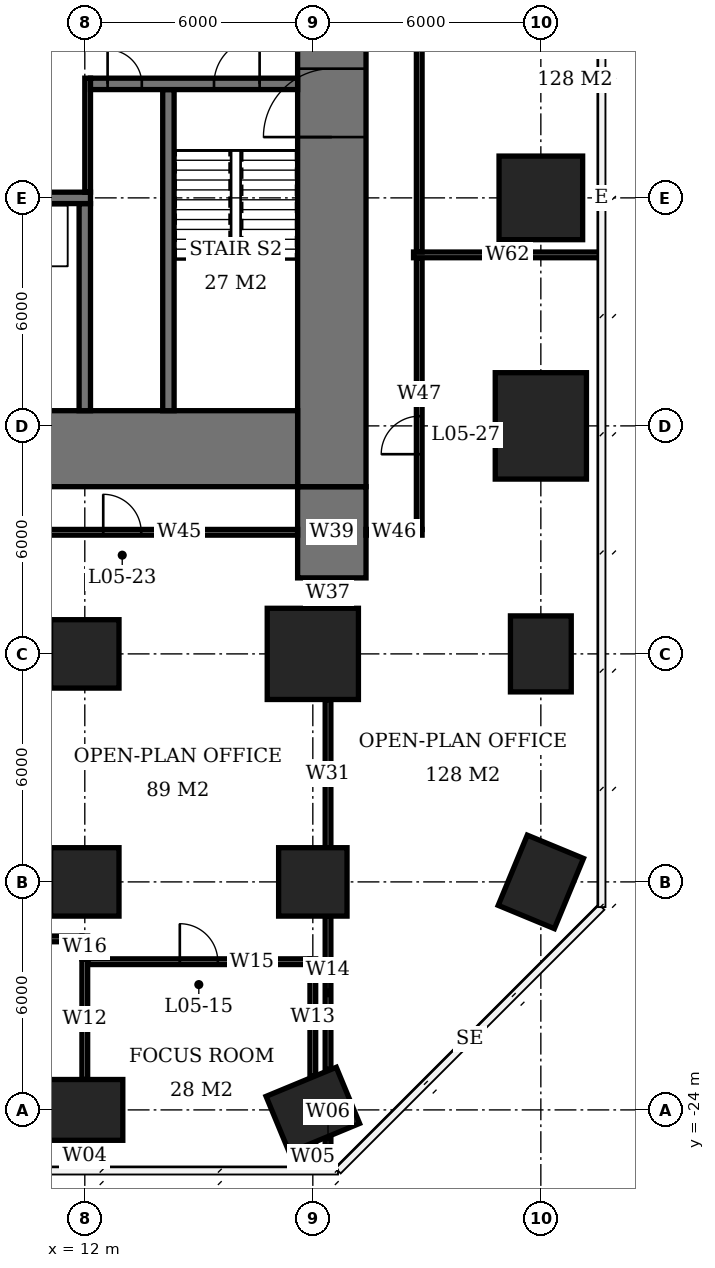
"""IFC4 building model, lengths in metres.
Left out: names, types, materials, properties, quantities, classifications, styles, units other than length and angle.
Written with IfcOpenShell. Run it as: python <this file> out.ifc"""

import sys

from ifc_helpers import new_model, si_unit, direction, frame, frame_2d, origin, origin_2d, place, context, subcontext, project, spatial, rectangle, extrude, element, fill, save


model = new_model("IFC4")
c1 = context("Model", 3, precision=1e-05, world=origin(), true_north=direction((0.0, 1.0)))
c2 = subcontext(c1, "Body", "Model", "MODEL_VIEW")
j1 = project(units=[si_unit("LENGTHUNIT", "METRE"), si_unit("PLANEANGLEUNIT", "RADIAN")], contexts=[c1])
p1 = place(None, origin())
s1 = spatial("IfcSite", under=j1, at=p1, CompositionType="ELEMENT")
p2 = place(p1, origin())
s2 = spatial("IfcBuilding", under=s1, at=p2, CompositionType="ELEMENT")
p3 = place(p2, frame((0.0, 0.0, 26.0)))
s3 = spatial("IfcBuildingStorey", under=s2, at=p3, CompositionType="ELEMENT", Elevation=26.0)
p4 = place(p3, frame((12.0, -24.0, 0.0), z_axis=(0.0, 0.0, 1.0), x_axis=(1.0, 0.0, 0.0)))
e1 = element("IfcColumn", 1, at=p4, inside=s3, PredefinedType="COLUMN", context=c2, shape_type="SweptSolid", body=[
    extrude(rectangle(XDim=2.0, YDim=1.6, at=origin_2d()), origin(), (0.0, 0.0, 1.0), 3.9),
])
for number, where, z_axis, x_axis in (
    (2, (12.0, -18.0, 0.0), (0.0, 0.0, 1.0), (1.0, 0.0, 0.0)),
    (3, (12.0, -12.0, 0.0), (0.0, 0.0, 1.0), (1.0, 0.0, 0.0)),
):
    element("IfcColumn", number, at=place(p3, frame(where, z_axis=z_axis, x_axis=x_axis)), inside=s3, PredefinedType="COLUMN", context=c2, shape_type="SweptSolid", body=[
        extrude(rectangle(XDim=1.8, YDim=1.8, at=origin_2d()), origin(), (0.0, 0.0, 1.0), 3.9),
    ])
p5 = place(p3, frame((18.0, -24.0, 0.0), z_axis=(0.0, 0.0, 1.0), x_axis=(-0.923879532511, -0.382683432365, 0.0)))
e4 = element("IfcColumn", 4, at=p5, inside=s3, PredefinedType="COLUMN", context=c2, shape_type="SweptSolid", body=[
    extrude(rectangle(XDim=2.0, YDim=1.6, at=origin_2d()), origin(), (0.0, 0.0, 1.0), 3.9),
])
p6 = place(p3, frame((18.0, -18.0, 0.0), z_axis=(0.0, 0.0, 1.0), x_axis=(1.0, 0.0, 0.0)))
e5 = element("IfcColumn", 5, at=p6, inside=s3, PredefinedType="COLUMN", context=c2, shape_type="SweptSolid", body=[
    extrude(rectangle(XDim=1.8, YDim=1.8, at=origin_2d()), origin(), (0.0, 0.0, 1.0), 3.9),
])
p7 = place(p3, frame((18.0, -12.0, 0.0), z_axis=(0.0, 0.0, 1.0), x_axis=(1.0, 0.0, 0.0)))
e6 = element("IfcColumn", 6, at=p7, inside=s3, PredefinedType="COLUMN", context=c2, shape_type="SweptSolid", body=[
    extrude(rectangle(XDim=2.4, YDim=2.4, at=origin_2d()), origin(), (0.0, 0.0, 1.0), 3.9),
])
for number, where, z_axis, x_axis in (
    (7, (24.0, -18.0, 0.0), (0.0, 0.0, 1.0), (-0.383, -0.924, 0.0)),
    (8, (24.0, -12.0, 0.0), (0.0, 0.0, 1.0), (0.0, 1.0, 0.0)),
):
    element("IfcColumn", number, at=place(p3, frame(where, z_axis=z_axis, x_axis=x_axis)), inside=s3, PredefinedType="COLUMN", context=c2, shape_type="SweptSolid", body=[
        extrude(rectangle(XDim=2.0, YDim=1.6, at=origin_2d()), origin(), (0.0, 0.0, 1.0), 3.9),
    ])
p8 = place(p3, frame((24.0, -6.0, 0.0), z_axis=(0.0, 0.0, 1.0), x_axis=(0.0, 1.0, 0.0)))
e9 = element("IfcColumn", 9, at=p8, inside=s3, PredefinedType="COLUMN", context=c2, shape_type="SweptSolid", body=[
    extrude(rectangle(XDim=2.8, YDim=2.4, at=origin_2d()), origin(), (0.0, 0.0, 1.0), 3.9),
])
p9 = place(p3, frame((24.0, 0.0, 0.0), z_axis=(0.0, 0.0, 1.0), x_axis=(1.0, 0.0, 0.0)))
e10 = element("IfcColumn", 10, at=p9, inside=s3, PredefinedType="COLUMN", context=c2, shape_type="SweptSolid", body=[
    extrude(rectangle(XDim=2.2, YDim=2.2, at=origin_2d()), origin(), (0.0, 0.0, 1.0), 3.9),
])
p10 = place(p3, frame((-5.6, -6.6, 0.0), z_axis=(0.0, 0.0, 1.0), x_axis=(1.0, 0.0, 0.0)))
e11 = element("IfcWall", 11, at=p10, inside=s3, PredefinedType="SHEAR", context=c2, shape_type="SweptSolid", body=[
    extrude(rectangle(XDim=23.2, YDim=2.0, at=frame_2d((11.6, 0.0))), origin(), (0.0, 0.0, 1.0), 3.9),
])
p11 = place(p3, frame((18.5, -7.6, 0.0), z_axis=(0.0, 0.0, 1.0), x_axis=(0.0, 1.0, 0.0)))
e12 = element("IfcWall", 12, at=p11, inside=s3, PredefinedType="SHEAR", context=c2, shape_type="SweptSolid", body=[
    extrude(rectangle(XDim=21.2, YDim=1.8, at=frame_2d((10.6, 0.0))), origin(), (0.0, 0.0, 1.0), 3.9),
])
p12 = place(p11, frame((9.2, 0.0, 0.0)))
e13 = element("IfcOpeningElement", 13, at=p12, cuts=e12, PredefinedType="OPENING", context=c2, shape_type="SweptSolid", body=[
    extrude(rectangle(XDim=1.8, YDim=2.4, at=frame_2d((0.9, 1.2))), frame((0.0, 0.91, 0.0), z_axis=(0.0, -1.0, 0.0), x_axis=(1.0, 0.0, 0.0)), (0.0, 0.0, 1.0), 1.82),
])
p13 = place(p3, frame((18.5, -10.0, 0.0), z_axis=(0.0, 0.0, 1.0), x_axis=(0.0, 1.0, 0.0)))
e14 = element("IfcWall", 14, at=p13, inside=s3, PredefinedType="SHEAR", context=c2, shape_type="SweptSolid", body=[
    extrude(rectangle(XDim=2.4, YDim=1.8, at=frame_2d((1.2, 0.0))), origin(), (0.0, 0.0, 1.0), 3.9),
])
p14 = place(p3, frame((-5.6, 0.0, 0.0), z_axis=(0.0, 0.0, 1.0), x_axis=(1.0, 0.0, 0.0)))
e15 = element("IfcWall", 15, at=p14, inside=s3, PredefinedType="SHEAR", context=c2, shape_type="SweptSolid", body=[
    extrude(rectangle(XDim=17.75, YDim=0.3, at=frame_2d((8.875, 0.0))), origin(), (0.0, 0.0, 1.0), 3.9),
])
p15 = place(p14, frame((0.6, 0.0, 0.0)))
e16 = element("IfcOpeningElement", 16, at=p15, cuts=e15, PredefinedType="OPENING", context=c2, shape_type="SweptSolid", body=[
    extrude(rectangle(XDim=0.9, YDim=2.1, at=frame_2d((0.45, 1.05))), frame((0.0, 0.16, 0.0), z_axis=(0.0, -1.0, 0.0), x_axis=(1.0, 0.0, 0.0)), (0.0, 0.0, 1.0), 0.32),
])
p16 = place(p14, frame((3.7, 0.0, 0.0)))
e17 = element("IfcOpeningElement", 17, at=p16, cuts=e15, PredefinedType="OPENING", context=c2, shape_type="SweptSolid", body=[
    extrude(rectangle(XDim=0.9, YDim=2.1, at=frame_2d((0.45, 1.05))), frame((0.0, 0.16, 0.0), z_axis=(0.0, -1.0, 0.0), x_axis=(1.0, 0.0, 0.0)), (0.0, 0.0, 1.0), 0.32),
])
p17 = place(p3, frame((12.15, 3.0, 0.0), z_axis=(0.0, 0.0, 1.0), x_axis=(1.0, 0.0, 0.0)))
e18 = element("IfcWall", 18, at=p17, inside=s3, PredefinedType="SHEAR", context=c2, shape_type="SweptSolid", body=[
    extrude(rectangle(XDim=5.45, YDim=0.3, at=frame_2d((2.725, 0.0))), origin(), (0.0, 0.0, 1.0), 3.9),
])
p18 = place(p17, frame((3.25, 0.0, 0.0)))
e19 = element("IfcOpeningElement", 19, at=p18, cuts=e18, PredefinedType="OPENING", context=c2, shape_type="SweptSolid", body=[
    extrude(rectangle(XDim=1.2, YDim=2.1, at=frame_2d((0.6, 1.05))), frame((0.0, 0.16, 0.0), z_axis=(0.0, -1.0, 0.0), x_axis=(1.0, 0.0, 0.0)), (0.0, 0.0, 1.0), 0.32),
])
p19 = place(p17, frame((0.45, 0.0, 0.0)))
e20 = element("IfcOpeningElement", 20, at=p19, cuts=e18, PredefinedType="OPENING", context=c2, shape_type="SweptSolid", body=[
    extrude(rectangle(XDim=0.9, YDim=2.1, at=frame_2d((0.45, 1.05))), frame((0.0, 0.16, 0.0), z_axis=(0.0, -1.0, 0.0), x_axis=(1.0, 0.0, 0.0)), (0.0, 0.0, 1.0), 0.32),
])
p20 = place(p3, frame((12.0, -5.6, 0.0), z_axis=(0.0, 0.0, 1.0), x_axis=(0.0, 1.0, 0.0)))
e21 = element("IfcWall", 21, at=p20, inside=s3, PredefinedType="SHEAR", context=c2, shape_type="SweptSolid", body=[
    extrude(rectangle(XDim=5.45, YDim=0.3, at=frame_2d((2.725, 0.0))), origin(), (0.0, 0.0, 1.0), 3.9),
])
p21 = place(p3, frame((14.2, -5.6, 0.0), z_axis=(0.0, 0.0, 1.0), x_axis=(0.0, 1.0, 0.0)))
e22 = element("IfcWall", 22, at=p21, inside=s3, PredefinedType="SHEAR", context=c2, shape_type="SweptSolid", body=[
    extrude(rectangle(XDim=8.45, YDim=0.3, at=frame_2d((4.225, 0.0))), origin(), (0.0, 0.0, 1.0), 3.9),
])
p22 = place(p3, frame((12.075, -20.1, 0.0), z_axis=(0.0, 0.0, 1.0), x_axis=(1.0, 0.0, 0.0)))
e23 = element("IfcWall", 23, at=p22, inside=s3, PredefinedType="PARTITIONING", context=c2, shape_type="SweptSolid", body=[
    extrude(rectangle(XDim=5.85, YDim=0.15, at=frame_2d((2.925, 0.0))), origin(), (0.0, 0.0, 1.0), 3.65),
])
p23 = place(p22, frame((2.425, 0.0, 0.0)))
e24 = element("IfcOpeningElement", 24, at=p23, cuts=e23, PredefinedType="OPENING", context=c2, shape_type="SweptSolid", body=[
    extrude(rectangle(XDim=1.0, YDim=2.1, at=frame_2d((0.5, 1.05))), frame((0.0, 0.085, 0.0), z_axis=(0.0, -1.0, 0.0), x_axis=(1.0, 0.0, 0.0)), (0.0, 0.0, 1.0), 0.17),
])
p24 = place(p3, frame((6.075, -19.5, 0.0), z_axis=(0.0, 0.0, 1.0), x_axis=(1.0, 0.0, 0.0)))
e25 = element("IfcWall", 25, at=p24, inside=s3, PredefinedType="PARTITIONING", context=c2, shape_type="SweptSolid", body=[
    extrude(rectangle(XDim=5.85, YDim=0.15, at=frame_2d((2.925, 0.0))), origin(), (0.0, 0.0, 1.0), 3.65),
])
p25 = place(p24, frame((2.425, 0.0, 0.0)))
e26 = element("IfcOpeningElement", 26, at=p25, cuts=e25, PredefinedType="OPENING", context=c2, shape_type="SweptSolid", body=[
    extrude(rectangle(XDim=1.0, YDim=2.1, at=frame_2d((0.5, 1.05))), frame((0.0, 0.085, 0.0), z_axis=(0.0, -1.0, 0.0), x_axis=(1.0, 0.0, 0.0)), (0.0, 0.0, 1.0), 0.17),
])
p26 = place(p3, frame((12.0, -25.6, 0.0), z_axis=(0.0, 0.0, 1.0), x_axis=(0.0, 1.0, 0.0)))
e27 = element("IfcWall", 27, at=p26, inside=s3, PredefinedType="PARTITIONING", context=c2, shape_type="SweptSolid", body=[
    extrude(rectangle(XDim=0.8, YDim=0.15, at=frame_2d((0.4, 0.0))), origin(), (0.0, 0.0, 1.0), 3.65),
])
p27 = place(p3, frame((12.0, -23.2, 0.0), z_axis=(0.0, 0.0, 1.0), x_axis=(0.0, 1.0, 0.0)))
e28 = element("IfcWall", 28, at=p27, inside=s3, PredefinedType="PARTITIONING", context=c2, shape_type="SweptSolid", body=[
    extrude(rectangle(XDim=3.175, YDim=0.15, at=frame_2d((1.587, 0.0))), origin(), (0.0, 0.0, 1.0), 3.65),
])
p28 = place(p3, frame((12.0, -20.025, 0.0), z_axis=(0.0, 0.0, 1.0), x_axis=(0.0, 1.0, 0.0)))
e29 = element("IfcWall", 29, at=p28, inside=s3, PredefinedType="PARTITIONING", context=c2, shape_type="SweptSolid", body=[
    extrude(rectangle(XDim=0.6, YDim=0.15, at=frame_2d((0.3, 0.0))), origin(), (0.0, 0.0, 1.0), 3.65),
])
p29 = place(p3, frame((18.0, -25.6, 0.0), z_axis=(0.0, 0.0, 1.0), x_axis=(0.0, 1.0, 0.0)))
e30 = element("IfcWall", 30, at=p29, inside=s3, PredefinedType="PARTITIONING", context=c2, shape_type="SweptSolid", body=[
    extrude(rectangle(XDim=0.703, YDim=0.15, at=frame_2d((0.352, 0.0))), origin(), (0.0, 0.0, 1.0), 3.65),
])
p30 = place(p3, frame((18.0, -23.103, 0.0), z_axis=(0.0, 0.0, 1.0), x_axis=(0.0, 1.0, 0.0)))
e31 = element("IfcWall", 31, at=p30, inside=s3, PredefinedType="PARTITIONING", context=c2, shape_type="SweptSolid", body=[
    extrude(rectangle(XDim=3.078, YDim=0.15, at=frame_2d((1.539, 0.0))), origin(), (0.0, 0.0, 1.0), 3.65),
])
p31 = place(p3, frame((10.575, -8.8, 0.0), z_axis=(0.0, 0.0, 1.0), x_axis=(1.0, 0.0, 0.0)))
e32 = element("IfcWall", 32, at=p31, inside=s3, PredefinedType="PARTITIONING", context=c2, shape_type="SweptSolid", body=[
    extrude(rectangle(XDim=7.025, YDim=0.15, at=frame_2d((3.513, 0.0))), origin(), (0.0, 0.0, 1.0), 3.65),
])
p32 = place(p31, frame((1.91, 0.0, 0.0)))
e33 = element("IfcOpeningElement", 33, at=p32, cuts=e32, PredefinedType="OPENING", context=c2, shape_type="SweptSolid", body=[
    extrude(rectangle(XDim=1.0, YDim=2.1, at=frame_2d((0.5, 1.05))), frame((0.0, 0.085, 0.0), z_axis=(0.0, -1.0, 0.0), x_axis=(1.0, 0.0, 0.0)), (0.0, 0.0, 1.0), 0.17),
])
p33 = place(p3, frame((18.4, -25.6, 0.0), z_axis=(0.0, 0.0, 1.0), x_axis=(0.0, 1.0, 0.0)))
e34 = element("IfcWall", 34, at=p33, inside=s3, PredefinedType="PARTITIONING", context=c2, shape_type="SweptSolid", body=[
    extrude(rectangle(XDim=0.869, YDim=0.15, at=frame_2d((0.435, 0.0))), origin(), (0.0, 0.0, 1.0), 3.65),
])
p34 = place(p3, frame((18.4, -22.937, 0.0), z_axis=(0.0, 0.0, 1.0), x_axis=(0.0, 1.0, 0.0)))
e35 = element("IfcWall", 35, at=p34, inside=s3, PredefinedType="PARTITIONING", context=c2, shape_type="SweptSolid", body=[
    extrude(rectangle(XDim=4.037, YDim=0.15, at=frame_2d((2.019, 0.0))), origin(), (0.0, 0.0, 1.0), 3.65),
])
p35 = place(p3, frame((18.4, -17.1, 0.0), z_axis=(0.0, 0.0, 1.0), x_axis=(0.0, 1.0, 0.0)))
e36 = element("IfcWall", 36, at=p35, inside=s3, PredefinedType="PARTITIONING", context=c2, shape_type="SweptSolid", body=[
    extrude(rectangle(XDim=3.9, YDim=0.15, at=frame_2d((1.95, 0.0))), origin(), (0.0, 0.0, 1.0), 3.65),
])
p36 = place(p3, frame((18.4, -10.8, 0.0), z_axis=(0.0, 0.0, 1.0), x_axis=(0.0, 1.0, 0.0)))
e37 = element("IfcWall", 37, at=p36, inside=s3, PredefinedType="PARTITIONING", context=c2, shape_type="SweptSolid", body=[
    extrude(rectangle(XDim=0.8, YDim=0.15, at=frame_2d((0.4, 0.0))), origin(), (0.0, 0.0, 1.0), 3.65),
])
p37 = place(p3, frame((19.4, -8.8, 0.0), z_axis=(0.0, 0.0, 1.0), x_axis=(1.0, 0.0, 0.0)))
e38 = element("IfcWall", 38, at=p37, inside=s3, PredefinedType="PARTITIONING", context=c2, shape_type="SweptSolid", body=[
    extrude(rectangle(XDim=1.475, YDim=0.15, at=frame_2d((0.738, 0.0))), origin(), (0.0, 0.0, 1.0), 3.65),
])
p38 = place(p3, frame((20.8, -8.725, 0.0), z_axis=(0.0, 0.0, 1.0), x_axis=(0.0, 1.0, 0.0)))
e39 = element("IfcWall", 39, at=p38, inside=s3, PredefinedType="PARTITIONING", context=c2, shape_type="SweptSolid", body=[
    extrude(rectangle(XDim=7.15, YDim=0.15, at=frame_2d((3.575, 0.0))), origin(), (0.0, 0.0, 1.0), 3.65),
])
p39 = place(p38, frame((1.98, 0.0, 0.0)))
e40 = element("IfcOpeningElement", 40, at=p39, cuts=e39, PredefinedType="OPENING", context=c2, shape_type="SweptSolid", body=[
    extrude(rectangle(XDim=1.0, YDim=2.1, at=frame_2d((0.5, 1.05))), frame((0.0, 0.085, 0.0), z_axis=(0.0, -1.0, 0.0), x_axis=(1.0, 0.0, 0.0)), (0.0, 0.0, 1.0), 0.17),
])
p40 = place(p3, frame((20.8, -1.425, 0.0), z_axis=(0.0, 0.0, 1.0), x_axis=(0.0, 1.0, 0.0)))
e41 = element("IfcWall", 41, at=p40, inside=s3, PredefinedType="PARTITIONING", context=c2, shape_type="SweptSolid", body=[
    extrude(rectangle(XDim=16.15, YDim=0.15, at=frame_2d((8.075, 0.0))), origin(), (0.0, 0.0, 1.0), 3.65),
])
p41 = place(p40, frame((10.02, 0.0, 0.0)))
e42 = element("IfcOpeningElement", 42, at=p41, cuts=e41, PredefinedType="OPENING", context=c2, shape_type="SweptSolid", body=[
    extrude(rectangle(XDim=1.0, YDim=2.1, at=frame_2d((0.5, 1.05))), frame((0.0, 0.085, 0.0), z_axis=(0.0, -1.0, 0.0), x_axis=(1.0, 0.0, 0.0)), (0.0, 0.0, 1.0), 0.17),
])
p42 = place(p3, frame((20.65, -1.5, 0.0), z_axis=(0.0, 0.0, 1.0), x_axis=(1.0, 0.0, 0.0)))
e43 = element("IfcWall", 43, at=p42, inside=s3, PredefinedType="PARTITIONING", context=c2, shape_type="SweptSolid", body=[
    extrude(rectangle(XDim=4.95, YDim=0.15, at=frame_2d((2.475, 0.0))), origin(), (0.0, 0.0, 1.0), 3.65),
])
p43 = place(p3, frame((12.075, 0.15, 0.0), z_axis=(0.0, 0.0, 1.0), x_axis=(0.0, 1.0, 0.0)))
e44 = element("IfcWall", 44, at=p43, inside=s3, PredefinedType="PARTITIONING", context=c2, shape_type="SweptSolid", body=[
    extrude(rectangle(XDim=3.0, YDim=0.15, at=frame_2d((1.5, 0.0))), origin(), (0.0, 0.0, 1.0), 3.65),
])
p44 = place(p12, origin())
e45 = element("IfcDoor", 45, at=p44, inside=s3, OperationType="DOUBLE_DOOR_SINGLE_SWING", PredefinedType="DOOR", context=c2, shape_type="SweptSolid", body=[
    extrude(rectangle(XDim=1.8, YDim=2.4, at=frame_2d((0.9, 1.2))), frame((0.0, 0.025, 0.0), z_axis=(0.0, -1.0, 0.0), x_axis=(1.0, 0.0, 0.0)), (0.0, 0.0, 1.0), 0.05),
])
fill(e13, e45)
p45 = place(p18, origin())
e46 = element("IfcDoor", 46, at=p45, inside=s3, OperationType="SINGLE_SWING_RIGHT", PredefinedType="DOOR", context=c2, shape_type="SweptSolid", body=[
    extrude(rectangle(XDim=1.2, YDim=2.1, at=frame_2d((0.6, 1.05))), frame((0.0, 0.025, 0.0), z_axis=(0.0, -1.0, 0.0), x_axis=(1.0, 0.0, 0.0)), (0.0, 0.0, 1.0), 0.05),
])
fill(e19, e46)
p46 = place(p19, origin())
e47 = element("IfcDoor", 47, at=p46, inside=s3, OperationType="SINGLE_SWING_LEFT", PredefinedType="DOOR", context=c2, shape_type="SweptSolid", body=[
    extrude(rectangle(XDim=0.9, YDim=2.1, at=frame_2d((0.45, 1.05))), frame((0.0, 0.025, 0.0), z_axis=(0.0, -1.0, 0.0), x_axis=(1.0, 0.0, 0.0)), (0.0, 0.0, 1.0), 0.05),
])
fill(e20, e47)
p47 = place(p23, origin())
e48 = element("IfcDoor", 48, at=p47, inside=s3, OperationType="SINGLE_SWING_LEFT", PredefinedType="DOOR", context=c2, shape_type="SweptSolid", body=[
    extrude(rectangle(XDim=1.0, YDim=2.1, at=frame_2d((0.5, 1.05))), frame((0.0, 0.025, 0.0), z_axis=(0.0, -1.0, 0.0), x_axis=(1.0, 0.0, 0.0)), (0.0, 0.0, 1.0), 0.05),
])
fill(e24, e48)
p48 = place(p32, origin())
e49 = element("IfcDoor", 49, at=p48, inside=s3, OperationType="SINGLE_SWING_LEFT", PredefinedType="DOOR", context=c2, shape_type="SweptSolid", body=[
    extrude(rectangle(XDim=1.0, YDim=2.1, at=frame_2d((0.5, 1.05))), frame((0.0, 0.025, 0.0), z_axis=(0.0, -1.0, 0.0), x_axis=(1.0, 0.0, 0.0)), (0.0, 0.0, 1.0), 0.05),
])
fill(e33, e49)
p49 = place(p39, origin())
e50 = element("IfcDoor", 50, at=p49, inside=s3, OperationType="SINGLE_SWING_LEFT", PredefinedType="DOOR", context=c2, shape_type="SweptSolid", body=[
    extrude(rectangle(XDim=1.0, YDim=2.1, at=frame_2d((0.5, 1.05))), frame((0.0, 0.025, 0.0), z_axis=(0.0, -1.0, 0.0), x_axis=(1.0, 0.0, 0.0)), (0.0, 0.0, 1.0), 0.05),
])
fill(e40, e50)
save(model, sys.argv[1])
